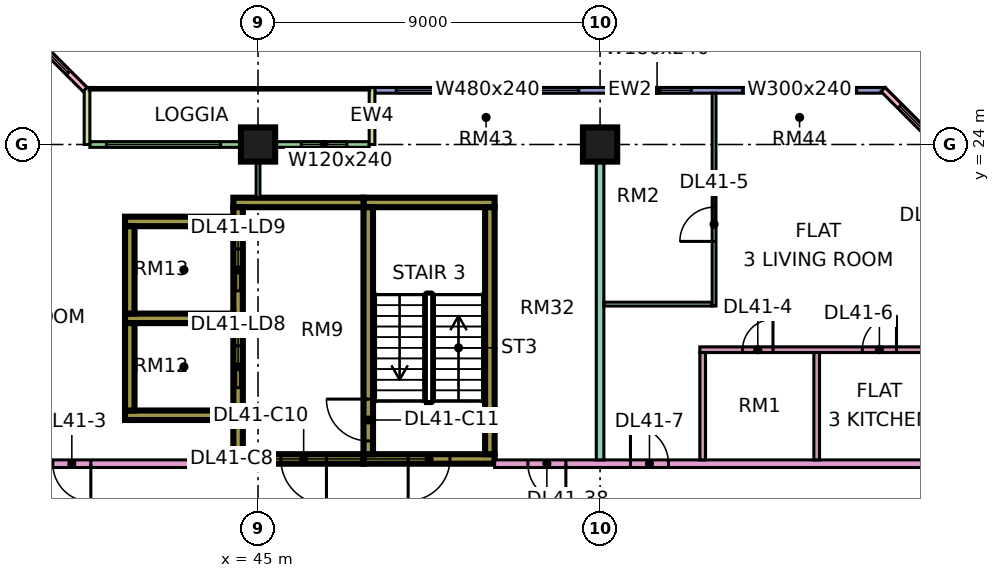
"""IFC4 building model, lengths in metres.
Left out: names, types, materials, properties, quantities, classifications, styles, units other than length and angle.
Written with IfcOpenShell. Run it as: python <this file> out.ifc"""

import sys

from ifc_helpers import new_model, si_unit, direction, frame, frame_2d, origin, origin_2d, place, context, subcontext, project, spatial, rectangle, extrude, element, fill, save


model = new_model("IFC4")
c1 = context("Model", 3, precision=1e-05, world=origin(), true_north=direction((0.0, 1.0)))
c2 = subcontext(c1, "Body", "Model", "MODEL_VIEW")
j1 = project(units=[si_unit("LENGTHUNIT", "METRE"), si_unit("PLANEANGLEUNIT", "RADIAN")], contexts=[c1])
p1 = place(None, origin())
s1 = spatial("IfcSite", under=j1, at=p1, CompositionType="ELEMENT")
p2 = place(p1, origin())
s2 = spatial("IfcBuilding", under=s1, at=p2, CompositionType="ELEMENT")
p3 = place(p2, frame((0.0, 0.0, 179.9)))
s3 = spatial("IfcBuildingStorey", under=s2, at=p3, CompositionType="ELEMENT", Elevation=179.9)
for number, where, z_axis, x_axis in (
    (1, (45.0, 24.0, 0.0), (0.0, 0.0, 1.0), (1.0, 0.0, 0.0)),
    (2, (54.0, 24.0, 0.0), (0.0, 0.0, 1.0), (1.0, 0.0, 0.0)),
):
    element("IfcColumn", number, at=place(p3, frame(where, z_axis=z_axis, x_axis=x_axis)), inside=s3, PredefinedType="COLUMN", context=c2, shape_type="SweptSolid", body=[
        extrude(rectangle(XDim=0.9, YDim=0.9, at=origin_2d()), origin(), (0.0, 0.0, 1.0), 3.75),
    ])
p4 = place(p3, frame((47.775, 15.725, 0.0), z_axis=(0.0, 0.0, 1.0), x_axis=(1.0, 0.0, 0.0)))
e3 = element("IfcWall", 3, at=p4, inside=s3, PredefinedType="SHEAR", context=c2, shape_type="SweptSolid", body=[
    extrude(rectangle(XDim=3.45, YDim=0.25, at=frame_2d((1.725, 0.0))), origin(), (0.0, 0.0, 1.0), 3.75),
])
p5 = place(p4, frame((1.175, 0.0, 0.0)))
e4 = element("IfcOpeningElement", 4, at=p5, cuts=e3, PredefinedType="OPENING", context=c2, shape_type="SweptSolid", body=[
    extrude(rectangle(XDim=1.1, YDim=2.2, at=frame_2d((0.55, 1.1))), frame((0.0, 0.135, 0.0), z_axis=(0.0, -1.0, 0.0), x_axis=(1.0, 0.0, 0.0)), (0.0, 0.0, 1.0), 0.27),
])
p6 = place(p3, frame((47.775, 22.475, 0.0), z_axis=(0.0, 0.0, 1.0), x_axis=(1.0, 0.0, 0.0)))
e5 = element("IfcWall", 5, at=p6, inside=s3, PredefinedType="SHEAR", context=c2, shape_type="SweptSolid", body=[
    extrude(rectangle(XDim=3.45, YDim=0.25, at=frame_2d((1.725, 0.0))), origin(), (0.0, 0.0, 1.0), 3.75),
])
p7 = place(p3, frame((47.9, 15.85, 0.0), z_axis=(0.0, 0.0, 1.0), x_axis=(0.0, 1.0, 0.0)))
e6 = element("IfcWall", 6, at=p7, inside=s3, PredefinedType="SHEAR", context=c2, shape_type="SweptSolid", body=[
    extrude(rectangle(XDim=6.5, YDim=0.25, at=frame_2d((3.25, 0.0))), origin(), (0.0, 0.0, 1.0), 3.75),
])
p8 = place(p7, frame((0.35, 0.0, 0.0)))
e7 = element("IfcOpeningElement", 7, at=p8, cuts=e6, PredefinedType="OPENING", context=c2, shape_type="SweptSolid", body=[
    extrude(rectangle(XDim=1.1, YDim=2.2, at=frame_2d((0.55, 1.1))), frame((0.0, 0.135, 0.0), z_axis=(0.0, -1.0, 0.0), x_axis=(1.0, 0.0, 0.0)), (0.0, 0.0, 1.0), 0.27),
])
p9 = place(p3, frame((51.1, 15.85, 0.0), z_axis=(0.0, 0.0, 1.0), x_axis=(0.0, 1.0, 0.0)))
e8 = element("IfcWall", 8, at=p9, inside=s3, PredefinedType="SHEAR", context=c2, shape_type="SweptSolid", body=[
    extrude(rectangle(XDim=6.5, YDim=0.25, at=frame_2d((3.25, 0.0))), origin(), (0.0, 0.0, 1.0), 3.75),
])
p10 = place(p3, frame((44.35, 15.725, 0.0), z_axis=(0.0, 0.0, 1.0), x_axis=(1.0, 0.0, 0.0)))
e9 = element("IfcWall", 9, at=p10, inside=s3, PredefinedType="SHEAR", context=c2, shape_type="SweptSolid", body=[
    extrude(rectangle(XDim=3.425, YDim=0.25, at=frame_2d((1.712, 0.0))), origin(), (0.0, 0.0, 1.0), 3.75),
])
p11 = place(p10, frame((1.25, 0.0, 0.0)))
e10 = element("IfcOpeningElement", 10, at=p11, cuts=e9, PredefinedType="OPENING", context=c2, shape_type="SweptSolid", body=[
    extrude(rectangle(XDim=1.2, YDim=2.2, at=frame_2d((0.6, 1.1))), frame((0.0, 0.135, 0.0), z_axis=(0.0, -1.0, 0.0), x_axis=(1.0, 0.0, 0.0)), (0.0, 0.0, 1.0), 0.27),
])
p12 = place(p3, frame((44.35, 22.475, 0.0), z_axis=(0.0, 0.0, 1.0), x_axis=(1.0, 0.0, 0.0)))
e11 = element("IfcWall", 11, at=p12, inside=s3, PredefinedType="SHEAR", context=c2, shape_type="SweptSolid", body=[
    extrude(rectangle(XDim=3.425, YDim=0.25, at=frame_2d((1.712, 0.0))), origin(), (0.0, 0.0, 1.0), 3.75),
])
p13 = place(p3, frame((44.475, 15.85, 0.0), z_axis=(0.0, 0.0, 1.0), x_axis=(0.0, 1.0, 0.0)))
e12 = element("IfcWall", 12, at=p13, inside=s3, PredefinedType="SHEAR", context=c2, shape_type="SweptSolid", body=[
    extrude(rectangle(XDim=6.5, YDim=0.25, at=frame_2d((3.25, 0.0))), origin(), (0.0, 0.0, 1.0), 3.75),
])
p14 = place(p13, frame((1.75, 0.0, 0.0)))
e13 = element("IfcOpeningElement", 13, at=p14, cuts=e12, PredefinedType="OPENING", context=c2, shape_type="SweptSolid", body=[
    extrude(rectangle(XDim=1.1, YDim=2.2, at=frame_2d((0.55, 1.1))), frame((0.0, 0.135, 0.0), z_axis=(0.0, -1.0, 0.0), x_axis=(1.0, 0.0, 0.0)), (0.0, 0.0, 1.0), 0.27),
])
p15 = place(p13, frame((4.3, 0.0, 0.0)))
e14 = element("IfcOpeningElement", 14, at=p15, cuts=e12, PredefinedType="OPENING", context=c2, shape_type="SweptSolid", body=[
    extrude(rectangle(XDim=1.1, YDim=2.2, at=frame_2d((0.55, 1.1))), frame((0.0, 0.135, 0.0), z_axis=(0.0, -1.0, 0.0), x_axis=(1.0, 0.0, 0.0)), (0.0, 0.0, 1.0), 0.27),
])
for number, where, z_axis, x_axis in (
    (15, (41.5, 16.875, 0.0), (0.0, 0.0, 1.0), (1.0, 0.0, 0.0)),
    (16, (41.5, 19.425, 0.0), (0.0, 0.0, 1.0), (1.0, 0.0, 0.0)),
    (17, (41.5, 21.975, 0.0), (0.0, 0.0, 1.0), (1.0, 0.0, 0.0)),
):
    element("IfcWall", number, at=place(p3, frame(where, z_axis=z_axis, x_axis=x_axis)), inside=s3, PredefinedType="SHEAR", context=c2, shape_type="SweptSolid", body=[
        extrude(rectangle(XDim=2.85, YDim=0.25, at=frame_2d((1.425, 0.0))), origin(), (0.0, 0.0, 1.0), 3.75),
    ])
for number, where, z_axis, x_axis in (
    (18, (41.625, 17.0, 0.0), (0.0, 0.0, 1.0), (0.0, 1.0, 0.0)),
    (19, (41.625, 19.55, 0.0), (0.0, 0.0, 1.0), (0.0, 1.0, 0.0)),
):
    element("IfcWall", number, at=place(p3, frame(where, z_axis=z_axis, x_axis=x_axis)), inside=s3, PredefinedType="SHEAR", context=c2, shape_type="SweptSolid", body=[
        extrude(rectangle(XDim=2.3, YDim=0.25, at=frame_2d((1.15, 0.0))), origin(), (0.0, 0.0, 1.0), 3.75),
    ])
p16 = place(p3, frame((61.5, 25.425, 0.0), z_axis=(0.0, 0.0, 1.0), x_axis=(-1.0, 0.0, 0.0)))
e20 = element("IfcWall", 20, at=p16, inside=s3, PredefinedType="SOLIDWALL", context=c2, shape_type="SweptSolid", body=[
    extrude(rectangle(XDim=13.425, YDim=0.15, at=frame_2d((6.712, 0.0))), origin(), (0.0, 0.0, 1.0), 3.35),
])
p17 = place(p16, frame((0.75, 0.0, 0.45)))
e21 = element("IfcOpeningElement", 21, at=p17, cuts=e20, PredefinedType="OPENING", context=c2, shape_type="SweptSolid", body=[
    extrude(rectangle(XDim=3.0, YDim=2.4, at=frame_2d((1.5, 1.2))), frame((0.0, 0.085, 0.0), z_axis=(0.0, -1.0, 0.0), x_axis=(1.0, 0.0, 0.0)), (0.0, 0.0, 1.0), 0.17),
])
p18 = place(p16, frame((5.1, 0.0, 0.45)))
e22 = element("IfcOpeningElement", 22, at=p18, cuts=e20, PredefinedType="OPENING", context=c2, shape_type="SweptSolid", body=[
    extrude(rectangle(XDim=1.8, YDim=2.4, at=frame_2d((0.9, 1.2))), frame((0.0, 0.085, 0.0), z_axis=(0.0, -1.0, 0.0), x_axis=(1.0, 0.0, 0.0)), (0.0, 0.0, 1.0), 0.17),
])
p19 = place(p16, frame((8.062, 0.0, 0.45)))
e23 = element("IfcOpeningElement", 23, at=p19, cuts=e20, PredefinedType="OPENING", context=c2, shape_type="SweptSolid", body=[
    extrude(rectangle(XDim=4.8, YDim=2.4, at=frame_2d((2.4, 1.2))), frame((0.0, 0.085, 0.0), z_axis=(0.0, -1.0, 0.0), x_axis=(1.0, 0.0, 0.0)), (0.0, 0.0, 1.0), 0.17),
])
p20 = place(p3, frame((47.925, 24.0, 0.0), z_axis=(0.0, 0.0, 1.0), x_axis=(-1.0, 0.0, 0.0)))
e24 = element("IfcWall", 24, at=p20, inside=s3, PredefinedType="SOLIDWALL", context=c2, shape_type="SweptSolid", body=[
    extrude(rectangle(XDim=7.35, YDim=0.15, at=frame_2d((3.675, 0.0))), origin(), (0.0, 0.0, 1.0), 3.35),
])
p21 = place(p20, frame((0.587, 0.0, 0.45)))
e25 = element("IfcOpeningElement", 25, at=p21, cuts=e24, PredefinedType="OPENING", context=c2, shape_type="SweptSolid", body=[
    extrude(rectangle(XDim=1.2, YDim=2.4, at=frame_2d((0.6, 1.2))), frame((0.0, 0.085, 0.0), z_axis=(0.0, -1.0, 0.0), x_axis=(1.0, 0.0, 0.0)), (0.0, 0.0, 1.0), 0.17),
])
p22 = place(p20, frame((3.913, 0.0, 0.45)))
e26 = element("IfcOpeningElement", 26, at=p22, cuts=e24, PredefinedType="OPENING", context=c2, shape_type="SweptSolid", body=[
    extrude(rectangle(XDim=3.0, YDim=2.4, at=frame_2d((1.5, 1.2))), frame((0.0, 0.085, 0.0), z_axis=(0.0, -1.0, 0.0), x_axis=(1.0, 0.0, 0.0)), (0.0, 0.0, 1.0), 0.17),
])
for number, where, z_axis, x_axis in (
    (27, (48.0, 25.5, 0.0), (0.0, 0.0, 1.0), (0.0, -1.0, 0.0)),
    (28, (40.5, 25.5, 0.0), (0.0, 0.0, 1.0), (0.0, -1.0, 0.0)),
):
    element("IfcWall", number, at=place(p3, frame(where, z_axis=z_axis, x_axis=x_axis)), inside=s3, PredefinedType="SOLIDWALL", context=c2, shape_type="SweptSolid", body=[
        extrude(rectangle(XDim=1.5, YDim=0.15, at=frame_2d((0.75, 0.0))), origin(), (0.0, 0.0, 1.0), 3.35),
    ])
p23 = place(p3, frame((40.447, 25.447, 0.0), z_axis=(0.0, 0.0, 1.0), x_axis=(-0.707106781187, 0.707106781187, 0.0)))
e29 = element("IfcWall", 29, at=p23, inside=s3, PredefinedType="SOLIDWALL", context=c2, shape_type="SweptSolid", body=[
    extrude(rectangle(XDim=4.243, YDim=0.15, at=frame_2d((2.121, 0.0))), origin(), (0.0, 0.0, 1.0), 3.35),
])
p24 = place(p23, frame((0.621, 0.0, 0.45)))
e30 = element("IfcOpeningElement", 30, at=p24, cuts=e29, PredefinedType="OPENING", context=c2, shape_type="SweptSolid", body=[
    extrude(rectangle(XDim=3.0, YDim=2.4, at=frame_2d((1.5, 1.2))), frame((0.0, 0.085, 0.0), z_axis=(0.0, -1.0, 0.0), x_axis=(1.0, 0.0, 0.0)), (0.0, 0.0, 1.0), 0.17),
])
p25 = place(p3, frame((64.447, 22.447, 0.0), z_axis=(0.0, 0.0, 1.0), x_axis=(-0.707106781187, 0.707106781187, 0.0)))
e31 = element("IfcWall", 31, at=p25, inside=s3, PredefinedType="SOLIDWALL", context=c2, shape_type="SweptSolid", body=[
    extrude(rectangle(XDim=4.243, YDim=0.15, at=frame_2d((2.121, 0.0))), origin(), (0.0, 0.0, 1.0), 3.35),
])
p26 = place(p25, frame((0.621, 0.0, 0.45)))
e32 = element("IfcOpeningElement", 32, at=p26, cuts=e31, PredefinedType="OPENING", context=c2, shape_type="SweptSolid", body=[
    extrude(rectangle(XDim=3.0, YDim=2.4, at=frame_2d((1.5, 1.2))), frame((0.0, 0.085, 0.0), z_axis=(0.0, -1.0, 0.0), x_axis=(1.0, 0.0, 0.0)), (0.0, 0.0, 1.0), 0.17),
])
p27 = place(p3, frame((34.0, 15.6, 0.0), z_axis=(0.0, 0.0, 1.0), x_axis=(1.0, 0.0, 0.0)))
e33 = element("IfcWall", 33, at=p27, inside=s3, PredefinedType="PARTITIONING", context=c2, shape_type="SweptSolid", body=[
    extrude(rectangle(XDim=10.35, YDim=0.2, at=frame_2d((5.175, 0.0))), origin(), (0.0, 0.0, 1.0), 3.35),
])
p28 = place(p27, frame((5.6, 0.0, 0.0)))
e34 = element("IfcOpeningElement", 34, at=p28, cuts=e33, PredefinedType="OPENING", context=c2, shape_type="SweptSolid", body=[
    extrude(rectangle(XDim=1.0, YDim=2.1, at=frame_2d((0.5, 1.05))), frame((0.0, 0.11, 0.0), z_axis=(0.0, -1.0, 0.0), x_axis=(1.0, 0.0, 0.0)), (0.0, 0.0, 1.0), 0.22),
])
p29 = place(p27, frame((0.45, 0.0, 0.0)))
e35 = element("IfcOpeningElement", 35, at=p29, cuts=e33, PredefinedType="OPENING", context=c2, shape_type="SweptSolid", body=[
    extrude(rectangle(XDim=1.2, YDim=2.1, at=frame_2d((0.6, 1.05))), frame((0.0, 0.11, 0.0), z_axis=(0.0, -1.0, 0.0), x_axis=(1.0, 0.0, 0.0)), (0.0, 0.0, 1.0), 0.22),
])
p30 = place(p3, frame((45.0, 22.6, 0.0), z_axis=(0.0, 0.0, 1.0), x_axis=(0.0, 1.0, 0.0)))
e36 = element("IfcWall", 36, at=p30, inside=s3, PredefinedType="PARTITIONING", context=c2, shape_type="SweptSolid", body=[
    extrude(rectangle(XDim=1.326, YDim=0.1, at=frame_2d((0.663, 0.0))), origin(), (0.0, 0.0, 1.0), 3.35),
])
p31 = place(p3, frame((51.225, 15.6, 0.0), z_axis=(0.0, 0.0, 1.0), x_axis=(1.0, 0.0, 0.0)))
e37 = element("IfcWall", 37, at=p31, inside=s3, PredefinedType="PARTITIONING", context=c2, shape_type="SweptSolid", body=[
    extrude(rectangle(XDim=11.701, YDim=0.2, at=frame_2d((5.851, 0.0))), origin(), (0.0, 0.0, 1.0), 3.35),
])
p32 = place(p31, frame((3.575, 0.0, 0.0)))
e38 = element("IfcOpeningElement", 38, at=p32, cuts=e37, PredefinedType="OPENING", context=c2, shape_type="SweptSolid", body=[
    extrude(rectangle(XDim=1.0, YDim=2.1, at=frame_2d((0.5, 1.05))), frame((0.0, 0.11, 0.0), z_axis=(0.0, -1.0, 0.0), x_axis=(1.0, 0.0, 0.0)), (0.0, 0.0, 1.0), 0.22),
])
p33 = place(p31, frame((0.875, 0.0, 0.0)))
e39 = element("IfcOpeningElement", 39, at=p33, cuts=e37, PredefinedType="OPENING", context=c2, shape_type="SweptSolid", body=[
    extrude(rectangle(XDim=1.0, YDim=2.1, at=frame_2d((0.5, 1.05))), frame((0.0, 0.11, 0.0), z_axis=(0.0, -1.0, 0.0), x_axis=(1.0, 0.0, 0.0)), (0.0, 0.0, 1.0), 0.22),
])
p34 = place(p3, frame((54.0, 15.7, 0.0), z_axis=(0.0, 0.0, 1.0), x_axis=(0.0, 1.0, 0.0)))
e40 = element("IfcWall", 40, at=p34, inside=s3, PredefinedType="PARTITIONING", context=c2, shape_type="SweptSolid", body=[
    extrude(rectangle(XDim=8.3, YDim=0.2, at=frame_2d((4.15, 0.0))), origin(), (0.0, 0.0, 1.0), 3.35),
])
p35 = place(p3, frame((54.1, 19.8, 0.0), z_axis=(0.0, 0.0, 1.0), x_axis=(1.0, 0.0, 0.0)))
e41 = element("IfcWall", 41, at=p35, inside=s3, PredefinedType="PARTITIONING", context=c2, shape_type="SweptSolid", body=[
    extrude(rectangle(XDim=2.85, YDim=0.1, at=frame_2d((1.425, 0.0))), origin(), (0.0, 0.0, 1.0), 3.35),
])
p36 = place(p3, frame((56.625, 18.6, 0.0), z_axis=(0.0, 0.0, 1.0), x_axis=(1.0, 0.0, 0.0)))
e42 = element("IfcWall", 42, at=p36, inside=s3, PredefinedType="PARTITIONING", context=c2, shape_type="SweptSolid", body=[
    extrude(rectangle(XDim=6.301, YDim=0.15, at=frame_2d((3.15, 0.0))), origin(), (0.0, 0.0, 1.0), 3.35),
])
p37 = place(p36, frame((1.125, 0.0, 0.0)))
e43 = element("IfcOpeningElement", 43, at=p37, cuts=e42, PredefinedType="OPENING", context=c2, shape_type="SweptSolid", body=[
    extrude(rectangle(XDim=0.8, YDim=2.1, at=frame_2d((0.4, 1.05))), frame((0.0, 0.085, 0.0), z_axis=(0.0, -1.0, 0.0), x_axis=(1.0, 0.0, 0.0)), (0.0, 0.0, 1.0), 0.17),
])
p38 = place(p36, frame((4.275, 0.0, 0.0)))
e44 = element("IfcOpeningElement", 44, at=p38, cuts=e42, PredefinedType="OPENING", context=c2, shape_type="SweptSolid", body=[
    extrude(rectangle(XDim=0.9, YDim=2.1, at=frame_2d((0.45, 1.05))), frame((0.0, 0.085, 0.0), z_axis=(0.0, -1.0, 0.0), x_axis=(1.0, 0.0, 0.0)), (0.0, 0.0, 1.0), 0.17),
])
p39 = place(p3, frame((56.7, 15.7, 0.0), z_axis=(0.0, 0.0, 1.0), x_axis=(0.0, 1.0, 0.0)))
e45 = element("IfcWall", 45, at=p39, inside=s3, PredefinedType="PARTITIONING", context=c2, shape_type="SweptSolid", body=[
    extrude(rectangle(XDim=2.825, YDim=0.15, at=frame_2d((1.413, 0.0))), origin(), (0.0, 0.0, 1.0), 3.35),
])
p40 = place(p3, frame((57.0, 19.75, 0.0), z_axis=(0.0, 0.0, 1.0), x_axis=(0.0, 1.0, 0.0)))
e46 = element("IfcWall", 46, at=p40, inside=s3, PredefinedType="PARTITIONING", context=c2, shape_type="SweptSolid", body=[
    extrude(rectangle(XDim=5.6, YDim=0.1, at=frame_2d((2.8, 0.0))), origin(), (0.0, 0.0, 1.0), 3.35),
])
p41 = place(p40, frame((1.7, 0.0, 0.0)))
e47 = element("IfcOpeningElement", 47, at=p41, cuts=e46, PredefinedType="OPENING", context=c2, shape_type="SweptSolid", body=[
    extrude(rectangle(XDim=0.9, YDim=2.1, at=frame_2d((0.45, 1.05))), frame((0.0, 0.06, 0.0), z_axis=(0.0, -1.0, 0.0), x_axis=(1.0, 0.0, 0.0)), (0.0, 0.0, 1.0), 0.12),
])
p42 = place(p3, frame((59.7, 15.7, 0.0), z_axis=(0.0, 0.0, 1.0), x_axis=(0.0, 1.0, 0.0)))
e48 = element("IfcWall", 48, at=p42, inside=s3, PredefinedType="PARTITIONING", context=c2, shape_type="SweptSolid", body=[
    extrude(rectangle(XDim=2.825, YDim=0.15, at=frame_2d((1.413, 0.0))), origin(), (0.0, 0.0, 1.0), 3.35),
])
p43 = place(p17, origin())
e49 = element("IfcWindow", 49, at=p43, inside=s3, PartitioningType="SINGLE_PANEL", PredefinedType="WINDOW", context=c2, shape_type="SweptSolid", body=[
    extrude(rectangle(XDim=3.0, YDim=2.4, at=frame_2d((1.5, 1.2))), frame((0.0, 0.03, 0.0), z_axis=(0.0, -1.0, 0.0), x_axis=(1.0, 0.0, 0.0)), (0.0, 0.0, 1.0), 0.06),
])
fill(e21, e49)
p44 = place(p18, origin())
e50 = element("IfcWindow", 50, at=p44, inside=s3, PartitioningType="SINGLE_PANEL", PredefinedType="WINDOW", context=c2, shape_type="SweptSolid", body=[
    extrude(rectangle(XDim=1.8, YDim=2.4, at=frame_2d((0.9, 1.2))), frame((0.0, 0.03, 0.0), z_axis=(0.0, -1.0, 0.0), x_axis=(1.0, 0.0, 0.0)), (0.0, 0.0, 1.0), 0.06),
])
fill(e22, e50)
p45 = place(p19, origin())
e51 = element("IfcWindow", 51, at=p45, inside=s3, PartitioningType="SINGLE_PANEL", PredefinedType="WINDOW", context=c2, shape_type="SweptSolid", body=[
    extrude(rectangle(XDim=4.8, YDim=2.4, at=frame_2d((2.4, 1.2))), frame((0.0, 0.03, 0.0), z_axis=(0.0, -1.0, 0.0), x_axis=(1.0, 0.0, 0.0)), (0.0, 0.0, 1.0), 0.06),
])
fill(e23, e51)
p46 = place(p21, origin())
e52 = element("IfcWindow", 52, at=p46, inside=s3, PartitioningType="SINGLE_PANEL", PredefinedType="WINDOW", context=c2, shape_type="SweptSolid", body=[
    extrude(rectangle(XDim=1.2, YDim=2.4, at=frame_2d((0.6, 1.2))), frame((0.0, 0.03, 0.0), z_axis=(0.0, -1.0, 0.0), x_axis=(1.0, 0.0, 0.0)), (0.0, 0.0, 1.0), 0.06),
])
fill(e25, e52)
p47 = place(p22, origin())
e53 = element("IfcWindow", 53, at=p47, inside=s3, PartitioningType="SINGLE_PANEL", PredefinedType="WINDOW", context=c2, shape_type="SweptSolid", body=[
    extrude(rectangle(XDim=3.0, YDim=2.4, at=frame_2d((1.5, 1.2))), frame((0.0, 0.03, 0.0), z_axis=(0.0, -1.0, 0.0), x_axis=(1.0, 0.0, 0.0)), (0.0, 0.0, 1.0), 0.06),
])
fill(e26, e53)
p48 = place(p24, origin())
e54 = element("IfcWindow", 54, at=p48, inside=s3, PartitioningType="SINGLE_PANEL", PredefinedType="WINDOW", context=c2, shape_type="SweptSolid", body=[
    extrude(rectangle(XDim=3.0, YDim=2.4, at=frame_2d((1.5, 1.2))), frame((0.0, 0.03, 0.0), z_axis=(0.0, -1.0, 0.0), x_axis=(1.0, 0.0, 0.0)), (0.0, 0.0, 1.0), 0.06),
])
fill(e30, e54)
p49 = place(p26, origin())
e55 = element("IfcWindow", 55, at=p49, inside=s3, PartitioningType="SINGLE_PANEL", PredefinedType="WINDOW", context=c2, shape_type="SweptSolid", body=[
    extrude(rectangle(XDim=3.0, YDim=2.4, at=frame_2d((1.5, 1.2))), frame((0.0, 0.03, 0.0), z_axis=(0.0, -1.0, 0.0), x_axis=(1.0, 0.0, 0.0)), (0.0, 0.0, 1.0), 0.06),
])
fill(e32, e55)
p50 = place(p5, frame((1.1, 0.0, 0.0), z_axis=(0.0, 0.0, 1.0), x_axis=(-1.0, 0.0, 0.0)))
e56 = element("IfcDoor", 56, at=p50, inside=s3, OperationType="SINGLE_SWING_LEFT", PredefinedType="DOOR", context=c2, shape_type="SweptSolid", body=[
    extrude(rectangle(XDim=1.1, YDim=2.2, at=frame_2d((0.55, 1.1))), frame((0.0, 0.025, 0.0), z_axis=(0.0, -1.0, 0.0), x_axis=(1.0, 0.0, 0.0)), (0.0, 0.0, 1.0), 0.05),
])
fill(e4, e56)
p51 = place(p11, origin())
e57 = element("IfcDoor", 57, at=p51, inside=s3, OperationType="SINGLE_SWING_RIGHT", PredefinedType="DOOR", context=c2, shape_type="SweptSolid", body=[
    extrude(rectangle(XDim=1.2, YDim=2.2, at=frame_2d((0.6, 1.1))), frame((0.0, 0.025, 0.0), z_axis=(0.0, -1.0, 0.0), x_axis=(1.0, 0.0, 0.0)), (0.0, 0.0, 1.0), 0.05),
])
fill(e10, e57)
p52 = place(p8, frame((1.1, 0.0, 0.0), z_axis=(0.0, 0.0, 1.0), x_axis=(-1.0, 0.0, 0.0)))
e58 = element("IfcDoor", 58, at=p52, inside=s3, OperationType="SINGLE_SWING_RIGHT", PredefinedType="DOOR", context=c2, shape_type="SweptSolid", body=[
    extrude(rectangle(XDim=1.1, YDim=2.2, at=frame_2d((0.55, 1.1))), frame((0.0, 0.025, 0.0), z_axis=(0.0, -1.0, 0.0), x_axis=(1.0, 0.0, 0.0)), (0.0, 0.0, 1.0), 0.05),
])
fill(e7, e58)
p53 = place(p14, origin())
e59 = element("IfcDoor", 59, at=p53, inside=s3, OperationType="DOUBLE_DOOR_SLIDING", PredefinedType="DOOR", context=c2, shape_type="SweptSolid", body=[
    extrude(rectangle(XDim=1.1, YDim=2.2, at=frame_2d((0.55, 1.1))), frame((0.0, 0.025, 0.0), z_axis=(0.0, -1.0, 0.0), x_axis=(1.0, 0.0, 0.0)), (0.0, 0.0, 1.0), 0.05),
])
fill(e13, e59)
p54 = place(p15, origin())
e60 = element("IfcDoor", 60, at=p54, inside=s3, OperationType="DOUBLE_DOOR_SLIDING", PredefinedType="DOOR", context=c2, shape_type="SweptSolid", body=[
    extrude(rectangle(XDim=1.1, YDim=2.2, at=frame_2d((0.55, 1.1))), frame((0.0, 0.025, 0.0), z_axis=(0.0, -1.0, 0.0), x_axis=(1.0, 0.0, 0.0)), (0.0, 0.0, 1.0), 0.05),
])
fill(e14, e60)
p55 = place(p28, origin())
e61 = element("IfcDoor", 61, at=p55, inside=s3, OperationType="SINGLE_SWING_RIGHT", PredefinedType="DOOR", context=c2, shape_type="SweptSolid", body=[
    extrude(rectangle(XDim=1.0, YDim=2.1, at=frame_2d((0.5, 1.05))), frame((0.0, 0.025, 0.0), z_axis=(0.0, -1.0, 0.0), x_axis=(1.0, 0.0, 0.0)), (0.0, 0.0, 1.0), 0.05),
])
fill(e34, e61)
p56 = place(p37, frame((0.8, 0.0, 0.0), z_axis=(0.0, 0.0, 1.0), x_axis=(-1.0, 0.0, 0.0)))
e62 = element("IfcDoor", 62, at=p56, inside=s3, OperationType="SINGLE_SWING_RIGHT", PredefinedType="DOOR", context=c2, shape_type="SweptSolid", body=[
    extrude(rectangle(XDim=0.8, YDim=2.1, at=frame_2d((0.4, 1.05))), frame((0.0, 0.025, 0.0), z_axis=(0.0, -1.0, 0.0), x_axis=(1.0, 0.0, 0.0)), (0.0, 0.0, 1.0), 0.05),
])
fill(e43, e62)
p57 = place(p41, origin())
e63 = element("IfcDoor", 63, at=p57, inside=s3, OperationType="SINGLE_SWING_LEFT", PredefinedType="DOOR", context=c2, shape_type="SweptSolid", body=[
    extrude(rectangle(XDim=0.9, YDim=2.1, at=frame_2d((0.45, 1.05))), frame((0.0, 0.025, 0.0), z_axis=(0.0, -1.0, 0.0), x_axis=(1.0, 0.0, 0.0)), (0.0, 0.0, 1.0), 0.05),
])
fill(e47, e63)
p58 = place(p38, frame((0.9, 0.0, 0.0), z_axis=(0.0, 0.0, 1.0), x_axis=(-1.0, 0.0, 0.0)))
e64 = element("IfcDoor", 64, at=p58, inside=s3, OperationType="SINGLE_SWING_RIGHT", PredefinedType="DOOR", context=c2, shape_type="SweptSolid", body=[
    extrude(rectangle(XDim=0.9, YDim=2.1, at=frame_2d((0.45, 1.05))), frame((0.0, 0.025, 0.0), z_axis=(0.0, -1.0, 0.0), x_axis=(1.0, 0.0, 0.0)), (0.0, 0.0, 1.0), 0.05),
])
fill(e44, e64)
p59 = place(p32, origin())
e65 = element("IfcDoor", 65, at=p59, inside=s3, OperationType="SINGLE_SWING_LEFT", PredefinedType="DOOR", context=c2, shape_type="SweptSolid", body=[
    extrude(rectangle(XDim=1.0, YDim=2.1, at=frame_2d((0.5, 1.05))), frame((0.0, 0.025, 0.0), z_axis=(0.0, -1.0, 0.0), x_axis=(1.0, 0.0, 0.0)), (0.0, 0.0, 1.0), 0.05),
])
fill(e38, e65)
p60 = place(p33, origin())
e66 = element("IfcDoor", 66, at=p60, inside=s3, OperationType="SINGLE_SWING_RIGHT", PredefinedType="DOOR", context=c2, shape_type="SweptSolid", body=[
    extrude(rectangle(XDim=1.0, YDim=2.1, at=frame_2d((0.5, 1.05))), frame((0.0, 0.025, 0.0), z_axis=(0.0, -1.0, 0.0), x_axis=(1.0, 0.0, 0.0)), (0.0, 0.0, 1.0), 0.05),
])
fill(e39, e66)
save(model, sys.argv[1])
